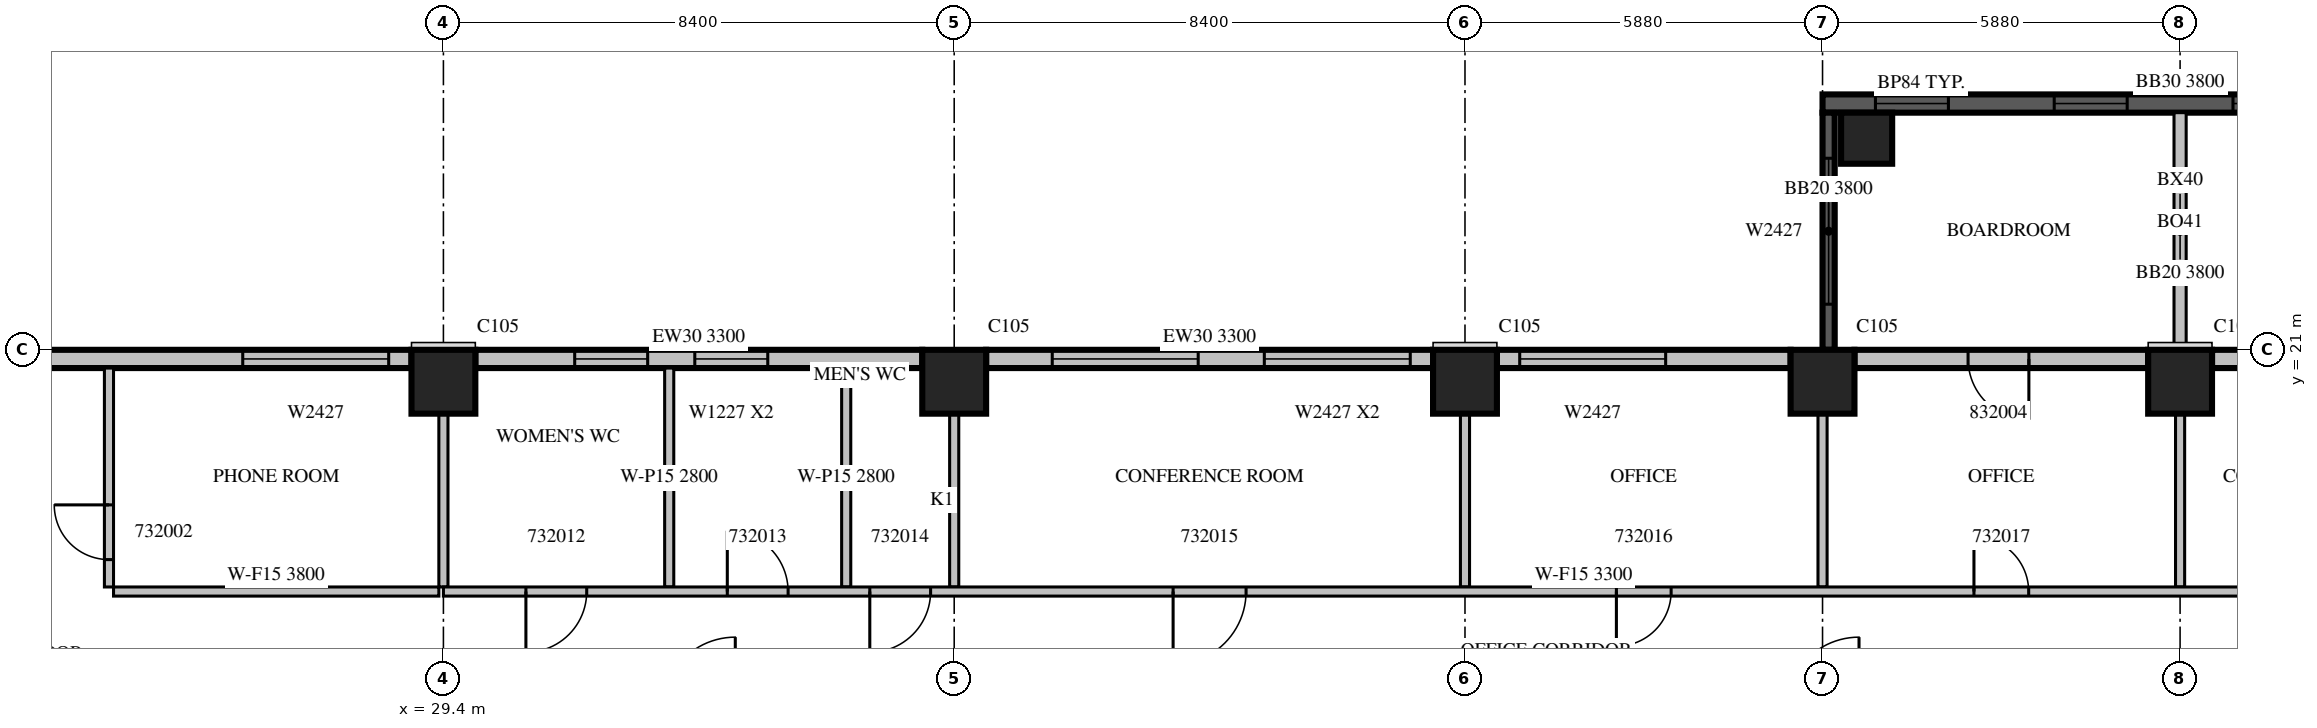
"""IFC4 building model, lengths in metres.
Left out: names, types, materials, properties, quantities, classifications, styles, units other than length and angle.
Written with IfcOpenShell. Run it as: python <this file> out.ifc"""

import sys

from ifc_helpers import new_model, si_unit, direction, frame, frame_2d, origin, origin_2d, place, context, subcontext, project, spatial, rectangle, extrude, source, transform, mapped, element, fill, save


model = new_model("IFC4")
c1 = context("Model", 3, precision=1e-05, world=origin(), true_north=direction((0.0, 1.0)))
c2 = subcontext(c1, "Body", "Model", "MODEL_VIEW")
j1 = project(units=[si_unit("LENGTHUNIT", "METRE"), si_unit("PLANEANGLEUNIT", "RADIAN")], contexts=[c1])
p1 = place(None, origin())
s1 = spatial("IfcSite", under=j1, at=p1, CompositionType="ELEMENT")
p2 = place(p1, origin())
s2 = spatial("IfcBuilding", under=s1, at=p2, CompositionType="ELEMENT")
p3 = place(p2, frame((0.0, 0.0, 145.5)))
s3 = spatial("IfcBuildingStorey", under=s2, at=p3, CompositionType="ELEMENT", Elevation=145.5)
m1 = source(origin(), c2, "Body", "SweptSolid", [
    extrude(rectangle(XDim=1.05, YDim=1.05, at=origin_2d()), origin(), (0.0, 0.0, 1.0), 4.2),
])
for number, where, z_axis, x_axis in (
    (1, (29.4, 20.475, 0.0), (0.0, 0.0, 1.0), (1.0, 0.0, 0.0)),
    (2, (37.8, 20.475, 0.0), (0.0, 0.0, 1.0), (1.0, 0.0, 0.0)),
    (3, (46.2, 20.475, 0.0), (0.0, 0.0, 1.0), (1.0, 0.0, 0.0)),
    (4, (52.08, 20.475, 0.0), (0.0, 0.0, 1.0), (1.0, 0.0, 0.0)),
    (5, (57.96, 20.475, 0.0), (0.0, 0.0, 1.0), (1.0, 0.0, 0.0)),
):
    element("IfcColumn", number, at=place(p3, frame(where, z_axis=z_axis, x_axis=x_axis)), inside=s3, PredefinedType="COLUMN", context=c2, shape_type="MappedRepresentation", body=[
        mapped(m1, transform((0.0, 0.0, 0.0), scale=1.0)),
    ])
m2 = source(origin(), c2, "Body", "SweptSolid", [
    extrude(rectangle(XDim=0.84, YDim=0.84, at=origin_2d()), origin(), (0.0, 0.0, 1.0), 4.2),
])
p4 = place(p3, frame((52.805, 24.48, 0.0), z_axis=(0.0, 0.0, 1.0), x_axis=(1.0, 0.0, 0.0)))
e6 = element("IfcColumn", 6, at=p4, inside=s3, PredefinedType="COLUMN", context=c2, shape_type="MappedRepresentation", body=[
    mapped(m2, transform((0.0, 0.0, 0.0), scale=1.0)),
])
m3 = source(origin(), c2, "Body", "SweptSolid", [
    extrude(rectangle(XDim=11.76, YDim=0.3, at=frame_2d((5.88, 0.0))), origin(), (0.0, 0.0, 1.0), 3.8),
])
p5 = place(p3, frame((63.84, 25.05, 0.0), z_axis=(0.0, 0.0, 1.0), x_axis=(-1.0, 0.0, 0.0)))
e7 = element("IfcWall", 7, at=p5, inside=s3, PredefinedType="SOLIDWALL", context=c2, shape_type="MappedRepresentation", body=[
    mapped(m3, transform((0.0, 0.0, 0.0), scale=1.0)),
])
m4 = source(origin(), c2, "Body", "SweptSolid", [
    extrude(rectangle(XDim=1.2, YDim=2.7, at=frame_2d((0.6, 1.35))), frame((0.0, 0.16, 0.0), z_axis=(0.0, -1.0, 0.0), x_axis=(1.0, 0.0, 0.0)), (0.0, 0.0, 1.0), 0.32),
])
p6 = place(p5, frame((0.87, 0.0, 0.6)))
e8 = element("IfcOpeningElement", 8, at=p6, cuts=e7, PredefinedType="OPENING", context=c2, shape_type="MappedRepresentation", body=[
    mapped(m4, transform((0.0, 0.0, 0.0), scale=1.0)),
])
p7 = place(p5, frame((3.81, 0.0, 0.6)))
e9 = element("IfcOpeningElement", 9, at=p7, cuts=e7, PredefinedType="OPENING", context=c2, shape_type="MappedRepresentation", body=[
    mapped(m4, transform((0.0, 0.0, 0.0), scale=1.0)),
])
p8 = place(p5, frame((6.75, 0.0, 0.6)))
e10 = element("IfcOpeningElement", 10, at=p8, cuts=e7, PredefinedType="OPENING", context=c2, shape_type="MappedRepresentation", body=[
    mapped(m4, transform((0.0, 0.0, 0.0), scale=1.0)),
])
p9 = place(p5, frame((9.69, 0.0, 0.6)))
e11 = element("IfcOpeningElement", 11, at=p9, cuts=e7, PredefinedType="OPENING", context=c2, shape_type="MappedRepresentation", body=[
    mapped(m4, transform((0.0, 0.0, 0.0), scale=1.0)),
])
m5 = source(origin(), c2, "Body", "SweptSolid", [
    extrude(rectangle(XDim=3.9, YDim=0.2, at=frame_2d((1.95, 0.0))), origin(), (0.0, 0.0, 1.0), 3.8),
])
p10 = place(p3, frame((57.96, 21.0, 0.0), z_axis=(0.0, 0.0, 1.0), x_axis=(0.0, 1.0, 0.0)))
e12 = element("IfcWall", 12, at=p10, inside=s3, PredefinedType="SOLIDWALL", context=c2, shape_type="MappedRepresentation", body=[
    mapped(m5, transform((0.0, 0.0, 0.0), scale=1.0)),
])
m6 = source(origin(), c2, "Body", "SweptSolid", [
    extrude(rectangle(XDim=3.9, YDim=0.2, at=frame_2d((1.95, 0.0))), origin(), (0.0, 0.0, 1.0), 3.8),
])
p11 = place(p3, frame((52.18, 21.0, 0.0), z_axis=(0.0, 0.0, 1.0), x_axis=(0.0, 1.0, 0.0)))
e13 = element("IfcWall", 13, at=p11, inside=s3, PredefinedType="SOLIDWALL", context=c2, shape_type="MappedRepresentation", body=[
    mapped(m6, transform((0.0, 0.0, 0.0), scale=1.0)),
])
m7 = source(origin(), c2, "Body", "SweptSolid", [
    extrude(rectangle(XDim=2.4, YDim=2.7, at=frame_2d((1.2, 1.35))), frame((0.0, 0.11, 0.0), z_axis=(0.0, -1.0, 0.0), x_axis=(1.0, 0.0, 0.0)), (0.0, 0.0, 1.0), 0.22),
])
p12 = place(p11, frame((0.75, 0.0, 0.6)))
e14 = element("IfcOpeningElement", 14, at=p12, cuts=e13, PredefinedType="OPENING", context=c2, shape_type="MappedRepresentation", body=[
    mapped(m7, transform((0.0, 0.0, 0.0), scale=1.0)),
])
m8 = source(origin(), c2, "Body", "SweptSolid", [
    extrude(rectangle(XDim=4.83, YDim=0.3, at=frame_2d((2.415, 0.0))), origin(), (0.0, 0.0, 1.0), 3.8),
])
p13 = place(p3, frame((63.315, 20.85, 0.0), z_axis=(0.0, 0.0, 1.0), x_axis=(-1.0, 0.0, 0.0)))
e15 = element("IfcWall", 15, at=p13, inside=s3, PredefinedType="STANDARD", context=c2, shape_type="MappedRepresentation", body=[
    mapped(m8, transform((0.0, 0.0, 0.0), scale=1.0)),
])
m9 = source(origin(), c2, "Body", "SweptSolid", [
    extrude(rectangle(XDim=1.0, YDim=2.1, at=frame_2d((0.5, 1.05))), frame((0.0, 0.16, 0.0), z_axis=(0.0, -1.0, 0.0), x_axis=(1.0, 0.0, 0.0)), (0.0, 0.0, 1.0), 0.32),
])
p14 = place(p13, frame((2.242, 0.0, 0.0)))
e16 = element("IfcOpeningElement", 16, at=p14, cuts=e15, PredefinedType="OPENING", context=c2, shape_type="MappedRepresentation", body=[
    mapped(m9, transform((0.0, 0.0, 0.0), scale=1.0)),
])
p15 = place(p3, frame((57.435, 20.85, 0.0), z_axis=(0.0, 0.0, 1.0), x_axis=(-1.0, 0.0, 0.0)))
e17 = element("IfcWall", 17, at=p15, inside=s3, PredefinedType="STANDARD", context=c2, shape_type="MappedRepresentation", body=[
    mapped(m8, transform((0.0, 0.0, 0.0), scale=1.0)),
])
p16 = place(p15, frame((1.962, 0.0, 0.0)))
e18 = element("IfcOpeningElement", 18, at=p16, cuts=e17, PredefinedType="OPENING", context=c2, shape_type="MappedRepresentation", body=[
    mapped(m9, transform((0.0, 0.0, 0.0), scale=1.0)),
])
p17 = place(p3, frame((51.555, 20.85, 0.0), z_axis=(0.0, 0.0, 1.0), x_axis=(-1.0, 0.0, 0.0)))
e19 = element("IfcWall", 19, at=p17, inside=s3, PredefinedType="STANDARD", context=c2, shape_type="MappedRepresentation", body=[
    mapped(m8, transform((0.0, 0.0, 0.0), scale=1.0)),
])
m10 = source(origin(), c2, "Body", "SweptSolid", [
    extrude(rectangle(XDim=2.4, YDim=2.7, at=frame_2d((1.2, 1.35))), frame((0.0, 0.16, 0.0), z_axis=(0.0, -1.0, 0.0), x_axis=(1.0, 0.0, 0.0)), (0.0, 0.0, 1.0), 0.32),
])
p18 = place(p17, frame((2.055, 0.0, 0.6)))
e20 = element("IfcOpeningElement", 20, at=p18, cuts=e19, PredefinedType="OPENING", context=c2, shape_type="MappedRepresentation", body=[
    mapped(m10, transform((0.0, 0.0, 0.0), scale=1.0)),
])
m11 = source(origin(), c2, "Body", "SweptSolid", [
    extrude(rectangle(XDim=7.35, YDim=0.3, at=frame_2d((3.675, 0.0))), origin(), (0.0, 0.0, 1.0), 3.3),
])
p19 = place(p3, frame((45.675, 20.85, 0.0), z_axis=(0.0, 0.0, 1.0), x_axis=(-1.0, 0.0, 0.0)))
e21 = element("IfcWall", 21, at=p19, inside=s3, PredefinedType="STANDARD", context=c2, shape_type="MappedRepresentation", body=[
    mapped(m11, transform((0.0, 0.0, 0.0), scale=1.0)),
])
p20 = place(p19, frame((0.375, 0.0, 0.6)))
e22 = element("IfcOpeningElement", 22, at=p20, cuts=e21, PredefinedType="OPENING", context=c2, shape_type="MappedRepresentation", body=[
    mapped(m10, transform((0.0, 0.0, 0.0), scale=1.0)),
])
p21 = place(p19, frame((3.862, 0.0, 0.6)))
e23 = element("IfcOpeningElement", 23, at=p21, cuts=e21, PredefinedType="OPENING", context=c2, shape_type="MappedRepresentation", body=[
    mapped(m10, transform((0.0, 0.0, 0.0), scale=1.0)),
])
p22 = place(p3, frame((37.275, 20.85, 0.0), z_axis=(0.0, 0.0, 1.0), x_axis=(-1.0, 0.0, 0.0)))
e24 = element("IfcWall", 24, at=p22, inside=s3, PredefinedType="STANDARD", context=c2, shape_type="MappedRepresentation", body=[
    mapped(m11, transform((0.0, 0.0, 0.0), scale=1.0)),
])
p23 = place(p22, frame((2.541, 0.0, 0.6)))
e25 = element("IfcOpeningElement", 25, at=p23, cuts=e24, PredefinedType="OPENING", context=c2, shape_type="MappedRepresentation", body=[
    mapped(m4, transform((0.0, 0.0, 0.0), scale=1.0)),
])
p24 = place(p22, frame((4.516, 0.0, 0.6)))
e26 = element("IfcOpeningElement", 26, at=p24, cuts=e24, PredefinedType="OPENING", context=c2, shape_type="MappedRepresentation", body=[
    mapped(m4, transform((0.0, 0.0, 0.0), scale=1.0)),
])
m12 = source(origin(), c2, "Body", "SweptSolid", [
    extrude(rectangle(XDim=6.875, YDim=0.3, at=frame_2d((3.438, 0.0))), origin(), (0.0, 0.0, 1.0), 3.8),
])
p25 = place(p3, frame((28.875, 20.85, 0.0), z_axis=(0.0, 0.0, 1.0), x_axis=(-1.0, 0.0, 0.0)))
e27 = element("IfcWall", 27, at=p25, inside=s3, PredefinedType="STANDARD", context=c2, shape_type="MappedRepresentation", body=[
    mapped(m12, transform((0.0, 0.0, 0.0), scale=1.0)),
])
p26 = place(p25, frame((0.375, 0.0, 0.6)))
e28 = element("IfcOpeningElement", 28, at=p26, cuts=e27, PredefinedType="OPENING", context=c2, shape_type="MappedRepresentation", body=[
    mapped(m10, transform((0.0, 0.0, 0.0), scale=1.0)),
])
m13 = source(origin(), c2, "Body", "SweptSolid", [
    extrude(rectangle(XDim=3.6, YDim=0.15, at=frame_2d((1.8, 0.0))), origin(), (0.0, 0.0, 1.0), 3.8),
])
p27 = place(p3, frame((23.9, 20.7, 0.0), z_axis=(0.0, 0.0, 1.0), x_axis=(0.0, -1.0, 0.0)))
e29 = element("IfcWall", 29, at=p27, inside=s3, PredefinedType="PARTITIONING", context=c2, shape_type="MappedRepresentation", body=[
    mapped(m13, transform((0.0, 0.0, 0.0), scale=1.0)),
])
m14 = source(origin(), c2, "Body", "SweptSolid", [
    extrude(rectangle(XDim=0.9, YDim=2.1, at=frame_2d((0.45, 1.05))), frame((0.0, 0.085, 0.0), z_axis=(0.0, -1.0, 0.0), x_axis=(1.0, 0.0, 0.0)), (0.0, 0.0, 1.0), 0.17),
])
p28 = place(p27, frame((2.25, 0.0, 0.0)))
e30 = element("IfcOpeningElement", 30, at=p28, cuts=e29, PredefinedType="OPENING", context=c2, shape_type="MappedRepresentation", body=[
    mapped(m14, transform((0.0, 0.0, 0.0), scale=1.0)),
])
m15 = source(origin(), c2, "Body", "SweptSolid", [
    extrude(rectangle(XDim=5.35, YDim=0.15, at=frame_2d((2.675, 0.0))), origin(), (0.0, 0.0, 1.0), 3.8),
])
p29 = place(p3, frame((23.975, 17.025, 0.0), z_axis=(0.0, 0.0, 1.0), x_axis=(1.0, 0.0, 0.0)))
e31 = element("IfcWall", 31, at=p29, inside=s3, PredefinedType="PARTITIONING", context=c2, shape_type="MappedRepresentation", body=[
    mapped(m15, transform((0.0, 0.0, 0.0), scale=1.0)),
])
m16 = source(origin(), c2, "Body", "SweptSolid", [
    extrude(rectangle(XDim=2.851, YDim=0.15, at=frame_2d((1.425, 0.0))), origin(), (0.0, 0.0, 1.0), 3.8),
])
p30 = place(p3, frame((29.4, 17.1, 0.0), z_axis=(0.0, 0.0, 1.0), x_axis=(0.0, 1.0, 0.0)))
e32 = element("IfcWall", 32, at=p30, inside=s3, PredefinedType="PARTITIONING", context=c2, shape_type="MappedRepresentation", body=[
    mapped(m16, transform((0.0, 0.0, 0.0), scale=1.0)),
])
m17 = source(origin(), c2, "Body", "SweptSolid", [
    extrude(rectangle(XDim=3.6, YDim=0.15, at=frame_2d((1.8, 0.0))), origin(), (0.0, 0.0, 1.0), 2.8),
])
for number, where, z_axis, x_axis in (
    (33, (33.113, 20.7, 0.0), (0.0, 0.0, 1.0), (0.0, -1.0, 0.0)),
    (34, (36.024, 20.7, 0.0), (0.0, 0.0, 1.0), (0.0, -1.0, 0.0)),
):
    element("IfcWall", number, at=place(p3, frame(where, z_axis=z_axis, x_axis=x_axis)), inside=s3, PredefinedType="PARTITIONING", context=c2, shape_type="MappedRepresentation", body=[
        mapped(m17, transform((0.0, 0.0, 0.0), scale=1.0)),
    ])
for number, where, z_axis, x_axis in (
    (35, (52.08, 19.951, 0.0), (0.0, 0.0, 1.0), (0.0, -1.0, 0.0)),
    (36, (37.8, 17.1, 0.0), (0.0, 0.0, 1.0), (0.0, 1.0, 0.0)),
    (37, (46.2, 17.1, 0.0), (0.0, 0.0, 1.0), (0.0, 1.0, 0.0)),
    (38, (57.96, 17.1, 0.0), (0.0, 0.0, 1.0), (0.0, 1.0, 0.0)),
):
    element("IfcWall", number, at=place(p3, frame(where, z_axis=z_axis, x_axis=x_axis)), inside=s3, PredefinedType="PARTITIONING", context=c2, shape_type="MappedRepresentation", body=[
        mapped(m16, transform((0.0, 0.0, 0.0), scale=1.0)),
    ])
m18 = source(origin(), c2, "Body", "SweptSolid", [
    extrude(rectangle(XDim=37.5, YDim=0.15, at=frame_2d((18.75, 0.0))), origin(), (0.0, 0.0, 1.0), 3.3),
])
p31 = place(p3, frame((29.4, 17.025, 0.0), z_axis=(0.0, 0.0, 1.0), x_axis=(1.0, 0.0, 0.0)))
e39 = element("IfcWall", 39, at=p31, inside=s3, PredefinedType="PARTITIONING", context=c2, shape_type="MappedRepresentation", body=[
    mapped(m18, transform((0.0, 0.0, 0.0), scale=1.0)),
])
m19 = source(origin(), c2, "Body", "SweptSolid", [
    extrude(rectangle(XDim=1.0, YDim=2.1, at=frame_2d((0.5, 1.05))), frame((0.0, 0.085, 0.0), z_axis=(0.0, -1.0, 0.0), x_axis=(1.0, 0.0, 0.0)), (0.0, 0.0, 1.0), 0.17),
])
p32 = place(p31, frame((1.357, 0.0, 0.0)))
e40 = element("IfcOpeningElement", 40, at=p32, cuts=e39, PredefinedType="OPENING", context=c2, shape_type="MappedRepresentation", body=[
    mapped(m19, transform((0.0, 0.0, 0.0), scale=1.0)),
])
p33 = place(p31, frame((4.669, 0.0, 0.0)))
e41 = element("IfcOpeningElement", 41, at=p33, cuts=e39, PredefinedType="OPENING", context=c2, shape_type="MappedRepresentation", body=[
    mapped(m19, transform((0.0, 0.0, 0.0), scale=1.0)),
])
p34 = place(p31, frame((7.012, 0.0, 0.0)))
e42 = element("IfcOpeningElement", 42, at=p34, cuts=e39, PredefinedType="OPENING", context=c2, shape_type="MappedRepresentation", body=[
    mapped(m19, transform((0.0, 0.0, 0.0), scale=1.0)),
])
m20 = source(origin(), c2, "Body", "SweptSolid", [
    extrude(rectangle(XDim=1.2, YDim=2.1, at=frame_2d((0.6, 1.05))), frame((0.0, 0.085, 0.0), z_axis=(0.0, -1.0, 0.0), x_axis=(1.0, 0.0, 0.0)), (0.0, 0.0, 1.0), 0.17),
])
p35 = place(p31, frame((12.0, 0.0, 0.0)))
e43 = element("IfcOpeningElement", 43, at=p35, cuts=e39, PredefinedType="OPENING", context=c2, shape_type="MappedRepresentation", body=[
    mapped(m20, transform((0.0, 0.0, 0.0), scale=1.0)),
])
p36 = place(p31, frame((19.29, 0.0, 0.0)))
e44 = element("IfcOpeningElement", 44, at=p36, cuts=e39, PredefinedType="OPENING", context=c2, shape_type="MappedRepresentation", body=[
    mapped(m14, transform((0.0, 0.0, 0.0), scale=1.0)),
])
p37 = place(p31, frame((25.17, 0.0, 0.0)))
e45 = element("IfcOpeningElement", 45, at=p37, cuts=e39, PredefinedType="OPENING", context=c2, shape_type="MappedRepresentation", body=[
    mapped(m14, transform((0.0, 0.0, 0.0), scale=1.0)),
])
p38 = place(p31, frame((30.214, 0.0, 0.0)))
e46 = element("IfcOpeningElement", 46, at=p38, cuts=e39, PredefinedType="OPENING", context=c2, shape_type="MappedRepresentation", body=[
    mapped(m20, transform((0.0, 0.0, 0.0), scale=1.0)),
])
p39 = place(p31, frame((34.721, 0.0, 0.0)))
e47 = element("IfcOpeningElement", 47, at=p39, cuts=e39, PredefinedType="OPENING", context=c2, shape_type="MappedRepresentation", body=[
    mapped(m20, transform((0.0, 0.0, 0.0), scale=1.0)),
])
m21 = source(origin(), c2, "Body", "SweptSolid", [
    extrude(rectangle(XDim=1.2, YDim=2.7, at=frame_2d((0.6, 1.35))), frame((0.0, 0.03, 0.0), z_axis=(0.0, -1.0, 0.0), x_axis=(1.0, 0.0, 0.0)), (0.0, 0.0, 1.0), 0.06),
])
p40 = place(p7, origin())
e48 = element("IfcWindow", 48, at=p40, inside=s3, PartitioningType="SINGLE_PANEL", PredefinedType="WINDOW", context=c2, shape_type="MappedRepresentation", body=[
    mapped(m21, transform((0.0, 0.0, 0.0), scale=1.0)),
])
fill(e9, e48)
p41 = place(p8, origin())
e49 = element("IfcWindow", 49, at=p41, inside=s3, PartitioningType="SINGLE_PANEL", PredefinedType="WINDOW", context=c2, shape_type="MappedRepresentation", body=[
    mapped(m21, transform((0.0, 0.0, 0.0), scale=1.0)),
])
fill(e10, e49)
p42 = place(p9, origin())
e50 = element("IfcWindow", 50, at=p42, inside=s3, PartitioningType="SINGLE_PANEL", PredefinedType="WINDOW", context=c2, shape_type="MappedRepresentation", body=[
    mapped(m21, transform((0.0, 0.0, 0.0), scale=1.0)),
])
fill(e11, e50)
m22 = source(origin(), c2, "Body", "SweptSolid", [
    extrude(rectangle(XDim=2.4, YDim=2.7, at=frame_2d((1.2, 1.35))), frame((0.0, 0.03, 0.0), z_axis=(0.0, -1.0, 0.0), x_axis=(1.0, 0.0, 0.0)), (0.0, 0.0, 1.0), 0.06),
])
p43 = place(p12, origin())
e51 = element("IfcWindow", 51, at=p43, inside=s3, PartitioningType="SINGLE_PANEL", PredefinedType="WINDOW", context=c2, shape_type="MappedRepresentation", body=[
    mapped(m22, transform((0.0, 0.0, 0.0), scale=1.0)),
])
fill(e14, e51)
p44 = place(p18, origin())
e52 = element("IfcWindow", 52, at=p44, inside=s3, PartitioningType="SINGLE_PANEL", PredefinedType="WINDOW", context=c2, shape_type="MappedRepresentation", body=[
    mapped(m22, transform((0.0, 0.0, 0.0), scale=1.0)),
])
fill(e20, e52)
p45 = place(p20, origin())
e53 = element("IfcWindow", 53, at=p45, inside=s3, PartitioningType="SINGLE_PANEL", PredefinedType="WINDOW", context=c2, shape_type="MappedRepresentation", body=[
    mapped(m22, transform((0.0, 0.0, 0.0), scale=1.0)),
])
fill(e22, e53)
p46 = place(p23, origin())
e54 = element("IfcWindow", 54, at=p46, inside=s3, PartitioningType="SINGLE_PANEL", PredefinedType="WINDOW", context=c2, shape_type="MappedRepresentation", body=[
    mapped(m21, transform((0.0, 0.0, 0.0), scale=1.0)),
])
fill(e25, e54)
p47 = place(p24, origin())
e55 = element("IfcWindow", 55, at=p47, inside=s3, PartitioningType="SINGLE_PANEL", PredefinedType="WINDOW", context=c2, shape_type="MappedRepresentation", body=[
    mapped(m21, transform((0.0, 0.0, 0.0), scale=1.0)),
])
fill(e26, e55)
p48 = place(p26, origin())
e56 = element("IfcWindow", 56, at=p48, inside=s3, PartitioningType="SINGLE_PANEL", PredefinedType="WINDOW", context=c2, shape_type="MappedRepresentation", body=[
    mapped(m22, transform((0.0, 0.0, 0.0), scale=1.0)),
])
fill(e28, e56)
p49 = place(p21, origin())
e57 = element("IfcWindow", 57, at=p49, inside=s3, PartitioningType="SINGLE_PANEL", PredefinedType="WINDOW", context=c2, shape_type="MappedRepresentation", body=[
    mapped(m22, transform((0.0, 0.0, 0.0), scale=1.0)),
])
fill(e23, e57)
m23 = source(origin(), c2, "Body", "SweptSolid", [
    extrude(rectangle(XDim=0.9, YDim=2.1, at=frame_2d((0.45, 1.05))), frame((0.0, 0.025, 0.0), z_axis=(0.0, -1.0, 0.0), x_axis=(1.0, 0.0, 0.0)), (0.0, 0.0, 1.0), 0.05),
])
p50 = place(p28, origin())
e58 = element("IfcDoor", 58, at=p50, inside=s3, OperationType="SINGLE_SWING_RIGHT", PredefinedType="DOOR", context=c2, shape_type="MappedRepresentation", body=[
    mapped(m23, transform((0.0, 0.0, 0.0), scale=1.0)),
])
fill(e30, e58)
m24 = source(origin(), c2, "Body", "SweptSolid", [
    extrude(rectangle(XDim=1.0, YDim=2.1, at=frame_2d((0.5, 1.05))), frame((0.0, 0.025, 0.0), z_axis=(0.0, -1.0, 0.0), x_axis=(1.0, 0.0, 0.0)), (0.0, 0.0, 1.0), 0.05),
])
p51 = place(p32, origin())
e59 = element("IfcDoor", 59, at=p51, inside=s3, OperationType="SINGLE_SWING_RIGHT", PredefinedType="DOOR", context=c2, shape_type="MappedRepresentation", body=[
    mapped(m24, transform((0.0, 0.0, 0.0), scale=1.0)),
])
fill(e40, e59)
p52 = place(p33, origin())
e60 = element("IfcDoor", 60, at=p52, inside=s3, OperationType="SINGLE_SWING_LEFT", PredefinedType="DOOR", context=c2, shape_type="MappedRepresentation", body=[
    mapped(m24, transform((0.0, 0.0, 0.0), scale=1.0)),
])
fill(e41, e60)
p53 = place(p34, origin())
e61 = element("IfcDoor", 61, at=p53, inside=s3, OperationType="SINGLE_SWING_RIGHT", PredefinedType="DOOR", context=c2, shape_type="MappedRepresentation", body=[
    mapped(m24, transform((0.0, 0.0, 0.0), scale=1.0)),
])
fill(e42, e61)
m25 = source(origin(), c2, "Body", "SweptSolid", [
    extrude(rectangle(XDim=1.2, YDim=2.1, at=frame_2d((0.6, 1.05))), frame((0.0, 0.025, 0.0), z_axis=(0.0, -1.0, 0.0), x_axis=(1.0, 0.0, 0.0)), (0.0, 0.0, 1.0), 0.05),
])
p54 = place(p35, origin())
e62 = element("IfcDoor", 62, at=p54, inside=s3, OperationType="SINGLE_SWING_RIGHT", PredefinedType="DOOR", context=c2, shape_type="MappedRepresentation", body=[
    mapped(m25, transform((0.0, 0.0, 0.0), scale=1.0)),
])
fill(e43, e62)
p55 = place(p36, origin())
e63 = element("IfcDoor", 63, at=p55, inside=s3, OperationType="SINGLE_SWING_RIGHT", PredefinedType="DOOR", context=c2, shape_type="MappedRepresentation", body=[
    mapped(m23, transform((0.0, 0.0, 0.0), scale=1.0)),
])
fill(e44, e63)
p56 = place(p37, origin())
e64 = element("IfcDoor", 64, at=p56, inside=s3, OperationType="SINGLE_SWING_LEFT", PredefinedType="DOOR", context=c2, shape_type="MappedRepresentation", body=[
    mapped(m23, transform((0.0, 0.0, 0.0), scale=1.0)),
])
fill(e45, e64)
p57 = place(p16, origin())
e65 = element("IfcDoor", 65, at=p57, inside=s3, OperationType="SINGLE_SWING_LEFT", PredefinedType="DOOR", context=c2, shape_type="MappedRepresentation", body=[
    mapped(m24, transform((0.0, 0.0, 0.0), scale=1.0)),
])
fill(e18, e65)
save(model, sys.argv[1])
